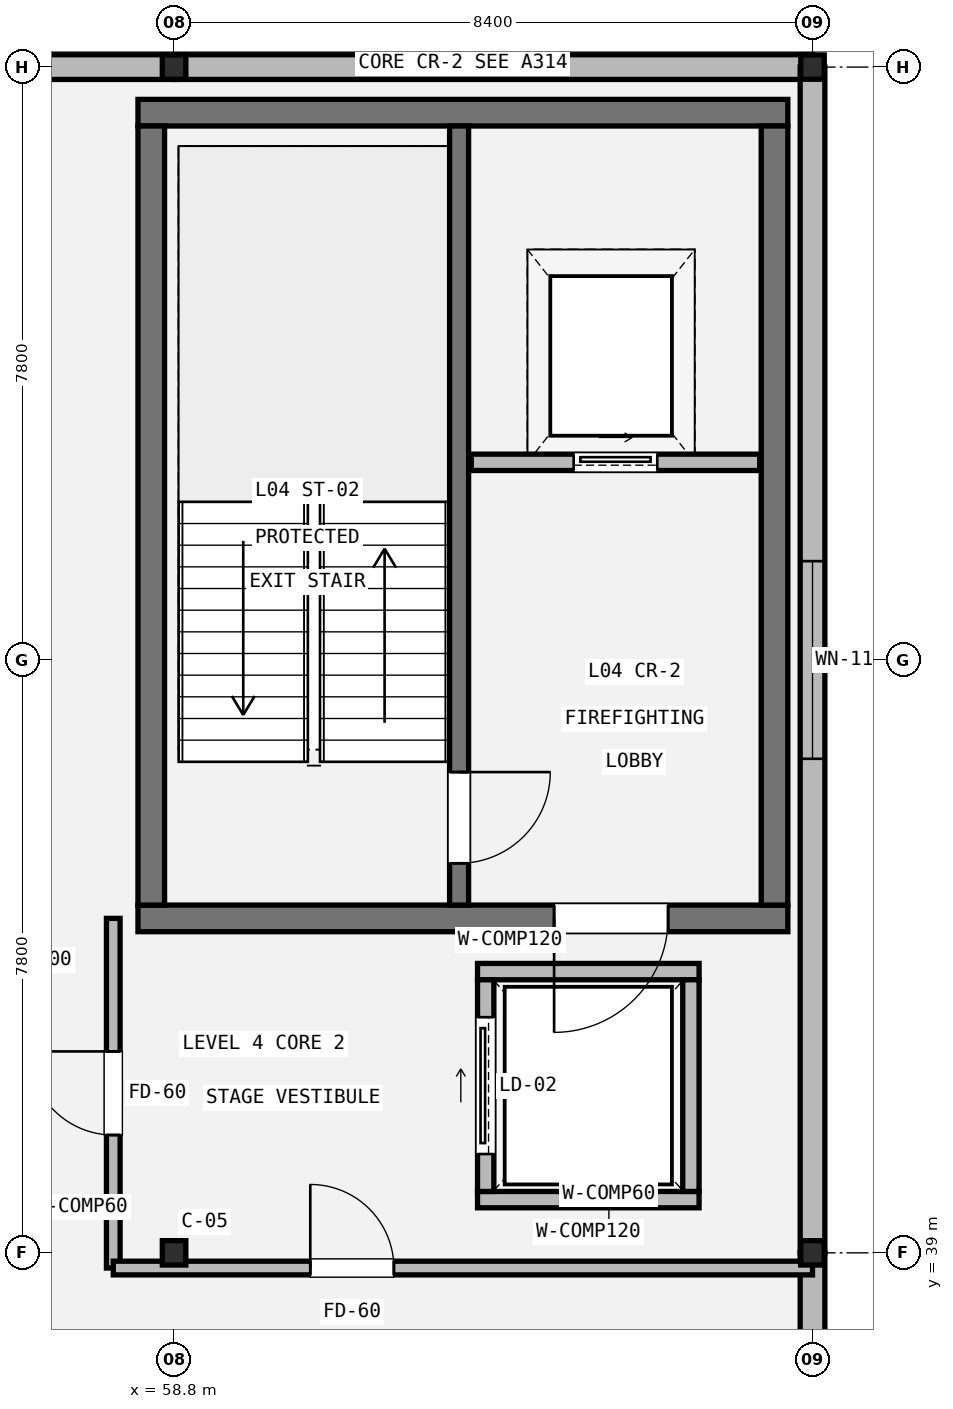
"""IFC4 building model, lengths in metres.
Left out: names, types, materials, properties, quantities, classifications, styles, units other than length and angle.
Written with IfcOpenShell. Run it as: python <this file> out.ifc"""

import sys

from ifc_helpers import new_model, si_unit, direction, frame, frame_2d, origin, origin_2d, place, context, subcontext, project, spatial, rectangle, i_section, extrude, element, fill, save


model = new_model("IFC4")
c1 = context("Model", 3, precision=1e-05, world=origin(), true_north=direction((0.0, 1.0)))
c2 = subcontext(c1, "Body", "Model", "MODEL_VIEW")
j1 = project(units=[si_unit("LENGTHUNIT", "METRE"), si_unit("PLANEANGLEUNIT", "RADIAN")], contexts=[c1])
p1 = place(None, origin())
s1 = spatial("IfcSite", under=j1, at=p1, CompositionType="ELEMENT")
p2 = place(p1, origin())
s2 = spatial("IfcBuilding", under=s1, at=p2, CompositionType="ELEMENT")
p3 = place(p2, frame((0.0, 0.0, 19.2)))
s3 = spatial("IfcBuildingStorey", under=s2, at=p3, CompositionType="ELEMENT", Elevation=19.2)
for number, where, z_axis, x_axis in (
    (1, (58.8, 39.0, 0.0), (0.0, 0.0, 1.0), (1.0, 0.0, 0.0)),
    (2, (58.8, 54.6, 0.0), (0.0, 0.0, 1.0), (1.0, 0.0, 0.0)),
    (3, (67.2, 39.0, 0.0), (0.0, 0.0, 1.0), (1.0, 0.0, 0.0)),
    (4, (67.2, 54.6, 0.0), (0.0, 0.0, 1.0), (1.0, 0.0, 0.0)),
):
    element("IfcColumn", number, at=place(p3, frame(where, z_axis=z_axis, x_axis=x_axis)), inside=s3, PredefinedType="COLUMN", context=c2, shape_type="SweptSolid", body=[
        extrude(i_section(OverallWidth=0.309, OverallDepth=0.321, WebThickness=0.014, FlangeThickness=0.022, FilletRadius=0.015, at=origin_2d()), origin(), (0.0, 0.0, 1.0), 4.2),
    ])
p4 = place(p3, frame((50.4, 54.6, 0.0), z_axis=(0.0, 0.0, 1.0), x_axis=(1.0, 0.0, 0.0)))
e5 = element("IfcWall", 5, at=p4, inside=s3, PredefinedType="STANDARD", context=c2, shape_type="SweptSolid", body=[
    extrude(rectangle(XDim=8.4, YDim=0.325, at=frame_2d((4.2, 0.0))), origin(), (0.0, 0.0, 1.0), 3.453),
])
p5 = place(p3, frame((58.8, 54.6, 0.0), z_axis=(0.0, 0.0, 1.0), x_axis=(1.0, 0.0, 0.0)))
e6 = element("IfcWall", 6, at=p5, inside=s3, PredefinedType="STANDARD", context=c2, shape_type="SweptSolid", body=[
    extrude(rectangle(XDim=8.4, YDim=0.325, at=frame_2d((4.2, 0.0))), origin(), (0.0, 0.0, 1.0), 3.222),
])
p6 = place(p3, frame((67.2, 54.6, 0.0), z_axis=(0.0, 0.0, 1.0), x_axis=(0.0, -1.0, 0.0)))
e7 = element("IfcWall", 7, at=p6, inside=s3, PredefinedType="STANDARD", context=c2, shape_type="SweptSolid", body=[
    extrude(rectangle(XDim=15.6, YDim=0.325, at=frame_2d((7.8, 0.0))), origin(), (0.0, 0.0, 1.0), 3.222),
])
p7 = place(p6, frame((6.5, 0.0, 0.9)))
e8 = element("IfcOpeningElement", 8, at=p7, cuts=e7, PredefinedType="OPENING", context=c2, shape_type="SweptSolid", body=[
    extrude(rectangle(XDim=2.6, YDim=1.2, at=frame_2d((1.3, 0.6))), frame((0.0, 0.172, 0.0), z_axis=(0.0, -1.0, 0.0), x_axis=(1.0, 0.0, 0.0)), (0.0, 0.0, 1.0), 0.345),
])
p8 = place(p3, frame((67.2, 39.0, 0.0), z_axis=(0.0, 0.0, 1.0), x_axis=(0.0, -1.0, 0.0)))
e9 = element("IfcWall", 9, at=p8, inside=s3, PredefinedType="STANDARD", context=c2, shape_type="SweptSolid", body=[
    extrude(rectangle(XDim=7.8, YDim=0.325, at=frame_2d((3.9, 0.0))), origin(), (0.0, 0.0, 1.0), 3.222),
])
p9 = place(p8, frame((2.5, 0.0, 0.9)))
e10 = element("IfcOpeningElement", 10, at=p9, cuts=e9, PredefinedType="OPENING", context=c2, shape_type="SweptSolid", body=[
    extrude(rectangle(XDim=2.8, YDim=1.2, at=frame_2d((1.4, 0.6))), frame((0.0, 0.172, 0.0), z_axis=(0.0, -1.0, 0.0), x_axis=(1.0, 0.0, 0.0)), (0.0, 0.0, 1.0), 0.345),
])
p10 = place(p3, frame((66.875, 43.4, 0.0), z_axis=(0.0, 0.0, 1.0), x_axis=(-1.0, 0.0, 0.0)))
e11 = element("IfcWall", 11, at=p10, inside=s3, PredefinedType="SHEAR", context=c2, shape_type="SweptSolid", body=[
    extrude(rectangle(XDim=8.55, YDim=0.35, at=frame_2d((4.275, 0.0))), origin(), (0.0, 0.0, 1.0), 4.0),
])
p11 = place(p10, frame((1.575, 0.0, 0.0)))
e12 = element("IfcOpeningElement", 12, at=p11, cuts=e11, PredefinedType="OPENING", context=c2, shape_type="SweptSolid", body=[
    extrude(rectangle(XDim=1.5, YDim=2.15, at=frame_2d((0.75, 1.075))), frame((0.0, 0.185, 0.0), z_axis=(0.0, -1.0, 0.0), x_axis=(1.0, 0.0, 0.0)), (0.0, 0.0, 1.0), 0.37),
])
p12 = place(p3, frame((58.325, 54.0, 0.0), z_axis=(0.0, 0.0, 1.0), x_axis=(1.0, 0.0, 0.0)))
e13 = element("IfcWall", 13, at=p12, inside=s3, PredefinedType="SHEAR", context=c2, shape_type="SweptSolid", body=[
    extrude(rectangle(XDim=8.55, YDim=0.35, at=frame_2d((4.275, 0.0))), origin(), (0.0, 0.0, 1.0), 4.0),
])
for number, where, z_axis, x_axis in (
    (14, (58.5, 43.575, 0.0), (0.0, 0.0, 1.0), (0.0, 1.0, 0.0)),
    (15, (66.7, 53.825, 0.0), (0.0, 0.0, 1.0), (0.0, -1.0, 0.0)),
):
    element("IfcWall", number, at=place(p3, frame(where, z_axis=z_axis, x_axis=x_axis)), inside=s3, PredefinedType="SHEAR", context=c2, shape_type="SweptSolid", body=[
        extrude(rectangle(XDim=10.25, YDim=0.35, at=frame_2d((5.125, 0.0))), origin(), (0.0, 0.0, 1.0), 4.0),
    ])
p13 = place(p3, frame((62.55, 53.825, 0.0), z_axis=(0.0, 0.0, 1.0), x_axis=(0.0, -1.0, 0.0)))
e16 = element("IfcWall", 16, at=p13, inside=s3, PredefinedType="SHEAR", context=c2, shape_type="SweptSolid", body=[
    extrude(rectangle(XDim=10.25, YDim=0.25, at=frame_2d((5.125, 0.0))), origin(), (0.0, 0.0, 1.0), 4.0),
])
p14 = place(p13, frame((8.5, 0.0, 0.0)))
e17 = element("IfcOpeningElement", 17, at=p14, cuts=e16, PredefinedType="OPENING", context=c2, shape_type="SweptSolid", body=[
    extrude(rectangle(XDim=1.2, YDim=2.15, at=frame_2d((0.6, 1.075))), frame((0.0, 0.135, 0.0), z_axis=(0.0, -1.0, 0.0), x_axis=(1.0, 0.0, 0.0)), (0.0, 0.0, 1.0), 0.27),
])
p15 = place(p3, frame((62.71, 49.4, 0.0), z_axis=(0.0, 0.0, 1.0), x_axis=(1.0, 0.0, 0.0)))
e18 = element("IfcWall", 18, at=p15, inside=s3, PredefinedType="STANDARD", context=c2, shape_type="SweptSolid", body=[
    extrude(rectangle(XDim=3.795, YDim=0.215, at=frame_2d((1.897, 0.0))), origin(), (0.0, 0.0, 1.0), 3.992),
])
p16 = place(p15, frame((1.347, 0.0, 0.0)))
e19 = element("IfcOpeningElement", 19, at=p16, cuts=e18, PredefinedType="OPENING", context=c2, shape_type="SweptSolid", body=[
    extrude(rectangle(XDim=1.1, YDim=2.2, at=frame_2d((0.55, 1.1))), frame((0.0, 0.117, 0.0), z_axis=(0.0, -1.0, 0.0), x_axis=(1.0, 0.0, 0.0)), (0.0, 0.0, 1.0), 0.235),
])
for number, where, z_axis, x_axis in (
    (20, (65.708, 39.7, 0.0), (0.0, 0.0, 1.0), (-1.0, 0.0, 0.0)),
    (21, (62.792, 42.7, 0.0), (0.0, 0.0, 1.0), (1.0, 0.0, 0.0)),
):
    element("IfcWall", number, at=place(p3, frame(where, z_axis=z_axis, x_axis=x_axis)), inside=s3, PredefinedType="STANDARD", context=c2, shape_type="SweptSolid", body=[
        extrude(rectangle(XDim=2.915, YDim=0.215, at=frame_2d((1.458, 0.0))), origin(), (0.0, 0.0, 1.0), 3.992),
    ])
p17 = place(p3, frame((62.9, 39.808, 0.0), z_axis=(0.0, 0.0, 1.0), x_axis=(0.0, 1.0, 0.0)))
e22 = element("IfcWall", 22, at=p17, inside=s3, PredefinedType="STANDARD", context=c2, shape_type="SweptSolid", body=[
    extrude(rectangle(XDim=2.785, YDim=0.215, at=frame_2d((1.393, 0.0))), origin(), (0.0, 0.0, 1.0), 3.992),
])
p18 = place(p17, frame((0.492, 0.0, 0.0)))
e23 = element("IfcOpeningElement", 23, at=p18, cuts=e22, PredefinedType="OPENING", context=c2, shape_type="SweptSolid", body=[
    extrude(rectangle(XDim=1.8, YDim=2.4, at=frame_2d((0.9, 1.2))), frame((0.0, 0.117, 0.0), z_axis=(0.0, -1.0, 0.0), x_axis=(1.0, 0.0, 0.0)), (0.0, 0.0, 1.0), 0.235),
])
p19 = place(p3, frame((65.6, 42.593, 0.0), z_axis=(0.0, 0.0, 1.0), x_axis=(0.0, -1.0, 0.0)))
e24 = element("IfcWall", 24, at=p19, inside=s3, PredefinedType="STANDARD", context=c2, shape_type="SweptSolid", body=[
    extrude(rectangle(XDim=2.785, YDim=0.215, at=frame_2d((1.393, 0.0))), origin(), (0.0, 0.0, 1.0), 3.992),
])
p20 = place(p3, frame((58.0, 38.8, 0.0), z_axis=(0.0, 0.0, 1.0), x_axis=(0.0, 1.0, 0.0)))
e25 = element("IfcWall", 25, at=p20, inside=s3, PredefinedType="STANDARD", context=c2, shape_type="SweptSolid", body=[
    extrude(rectangle(XDim=4.6, YDim=0.18, at=frame_2d((2.3, 0.0))), origin(), (0.0, 0.0, 1.0), 3.952),
])
p21 = place(p20, frame((1.75, 0.0, 0.0)))
e26 = element("IfcOpeningElement", 26, at=p21, cuts=e25, PredefinedType="OPENING", context=c2, shape_type="SweptSolid", body=[
    extrude(rectangle(XDim=1.1, YDim=2.15, at=frame_2d((0.55, 1.075))), frame((0.0, 0.1, 0.0), z_axis=(0.0, -1.0, 0.0), x_axis=(1.0, 0.0, 0.0)), (0.0, 0.0, 1.0), 0.2),
])
p22 = place(p3, frame((58.0, 38.8, 0.0), z_axis=(0.0, 0.0, 1.0), x_axis=(1.0, 0.0, 0.0)))
e27 = element("IfcWall", 27, at=p22, inside=s3, PredefinedType="STANDARD", context=c2, shape_type="SweptSolid", body=[
    extrude(rectangle(XDim=9.2, YDim=0.18, at=frame_2d((4.6, 0.0))), origin(), (0.0, 0.0, 1.0), 3.222),
])
p23 = place(p22, frame((2.592, 0.0, 0.0)))
e28 = element("IfcOpeningElement", 28, at=p23, cuts=e27, PredefinedType="OPENING", context=c2, shape_type="SweptSolid", body=[
    extrude(rectangle(XDim=1.1, YDim=2.15, at=frame_2d((0.55, 1.075))), frame((0.0, 0.1, 0.0), z_axis=(0.0, -1.0, 0.0), x_axis=(1.0, 0.0, 0.0)), (0.0, 0.0, 1.0), 0.2),
])
p24 = place(p7, origin())
e29 = element("IfcWindow", 29, at=p24, inside=s3, PartitioningType="SINGLE_PANEL", PredefinedType="WINDOW", context=c2, shape_type="SweptSolid", body=[
    extrude(rectangle(XDim=2.6, YDim=1.2, at=frame_2d((1.3, 0.6))), frame((0.0, 0.03, 0.0), z_axis=(0.0, -1.0, 0.0), x_axis=(1.0, 0.0, 0.0)), (0.0, 0.0, 1.0), 0.06),
])
fill(e8, e29)
p25 = place(p14, origin())
e30 = element("IfcDoor", 30, at=p25, inside=s3, OperationType="SINGLE_SWING_LEFT", PredefinedType="DOOR", context=c2, shape_type="SweptSolid", body=[
    extrude(rectangle(XDim=1.2, YDim=2.15, at=frame_2d((0.6, 1.075))), frame((0.0, 0.025, 0.0), z_axis=(0.0, -1.0, 0.0), x_axis=(1.0, 0.0, 0.0)), (0.0, 0.0, 1.0), 0.05),
])
fill(e17, e30)
p26 = place(p11, origin())
e31 = element("IfcDoor", 31, at=p26, inside=s3, OperationType="SINGLE_SWING_RIGHT", PredefinedType="DOOR", context=c2, shape_type="SweptSolid", body=[
    extrude(rectangle(XDim=1.5, YDim=2.15, at=frame_2d((0.75, 1.075))), frame((0.0, 0.025, 0.0), z_axis=(0.0, -1.0, 0.0), x_axis=(1.0, 0.0, 0.0)), (0.0, 0.0, 1.0), 0.05),
])
fill(e12, e31)
p27 = place(p16, origin())
e32 = element("IfcDoor", 32, at=p27, inside=s3, OperationType="SLIDING_TO_RIGHT", PredefinedType="DOOR", context=c2, shape_type="SweptSolid", body=[
    extrude(rectangle(XDim=1.1, YDim=2.2, at=frame_2d((0.55, 1.1))), frame((0.0, 0.025, 0.0), z_axis=(0.0, -1.0, 0.0), x_axis=(1.0, 0.0, 0.0)), (0.0, 0.0, 1.0), 0.05),
])
fill(e19, e32)
p28 = place(p18, origin())
e33 = element("IfcDoor", 33, at=p28, inside=s3, OperationType="SLIDING_TO_RIGHT", PredefinedType="DOOR", context=c2, shape_type="SweptSolid", body=[
    extrude(rectangle(XDim=1.8, YDim=2.4, at=frame_2d((0.9, 1.2))), frame((0.0, 0.025, 0.0), z_axis=(0.0, -1.0, 0.0), x_axis=(1.0, 0.0, 0.0)), (0.0, 0.0, 1.0), 0.05),
])
fill(e23, e33)
p29 = place(p21, origin())
e34 = element("IfcDoor", 34, at=p29, inside=s3, OperationType="SINGLE_SWING_RIGHT", PredefinedType="DOOR", context=c2, shape_type="SweptSolid", body=[
    extrude(rectangle(XDim=1.1, YDim=2.15, at=frame_2d((0.55, 1.075))), frame((0.0, 0.025, 0.0), z_axis=(0.0, -1.0, 0.0), x_axis=(1.0, 0.0, 0.0)), (0.0, 0.0, 1.0), 0.05),
])
fill(e26, e34)
p30 = place(p23, origin())
e35 = element("IfcDoor", 35, at=p30, inside=s3, OperationType="SINGLE_SWING_LEFT", PredefinedType="DOOR", context=c2, shape_type="SweptSolid", body=[
    extrude(rectangle(XDim=1.1, YDim=2.15, at=frame_2d((0.55, 1.075))), frame((0.0, 0.025, 0.0), z_axis=(0.0, -1.0, 0.0), x_axis=(1.0, 0.0, 0.0)), (0.0, 0.0, 1.0), 0.05),
])
fill(e28, e35)
save(model, sys.argv[1])
